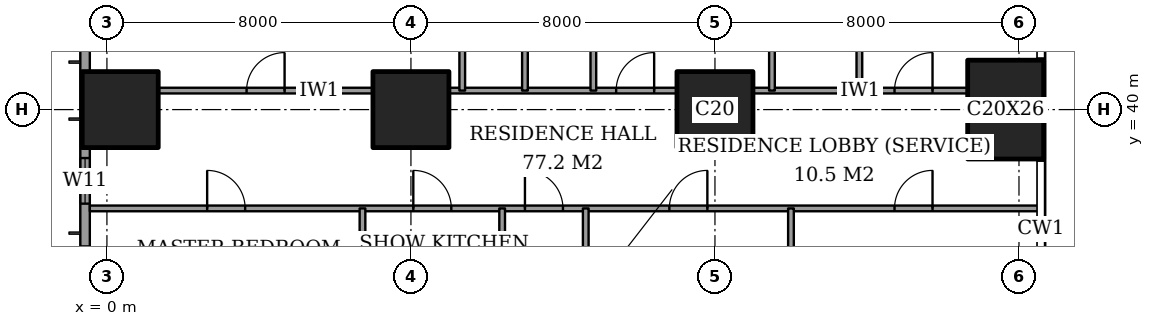
"""IFC4 building model, lengths in metres.
Left out: names, types, materials, properties, quantities, classifications, styles, units other than length and angle.
Written with IfcOpenShell. Run it as: python <this file> out.ifc"""

import sys

from ifc_helpers import new_model, si_unit, direction, frame, frame_2d, origin, origin_2d, place, context, subcontext, project, spatial, rectangle, extrude, element, fill, save


model = new_model("IFC4")
c1 = context("Model", 3, precision=1e-05, world=origin(), true_north=direction((0.0, 1.0)))
c2 = subcontext(c1, "Body", "Model", "MODEL_VIEW")
j1 = project(units=[si_unit("LENGTHUNIT", "METRE"), si_unit("PLANEANGLEUNIT", "RADIAN")], contexts=[c1])
p1 = place(None, origin())
s1 = spatial("IfcSite", under=j1, at=p1, CompositionType="ELEMENT")
p2 = place(p1, origin())
s2 = spatial("IfcBuilding", under=s1, at=p2, CompositionType="ELEMENT")
p3 = place(p2, frame((0.0, 0.0, 161.0)))
s3 = spatial("IfcBuildingStorey", under=s2, at=p3, CompositionType="ELEMENT", Elevation=161.0)
for number, where, z_axis, x_axis in (
    (1, (0.35, 40.0, 0.0), (0.0, 0.0, 1.0), (1.0, 0.0, 0.0)),
    (2, (8.0, 40.0, 0.0), (0.0, 0.0, 1.0), (1.0, 0.0, 0.0)),
    (3, (16.0, 40.0, 0.0), (0.0, 0.0, 1.0), (1.0, 0.0, 0.0)),
):
    element("IfcColumn", number, at=place(p3, frame(where, z_axis=z_axis, x_axis=x_axis)), inside=s3, PredefinedType="COLUMN", context=c2, shape_type="SweptSolid", body=[
        extrude(rectangle(XDim=2.0, YDim=2.0, at=origin_2d()), origin(), (0.0, 0.0, 1.0), 3.6),
    ])
p4 = place(p3, frame((23.65, 40.0, 0.0), z_axis=(0.0, 0.0, 1.0), x_axis=(1.0, 0.0, 0.0)))
e4 = element("IfcColumn", 4, at=p4, inside=s3, PredefinedType="COLUMN", context=c2, shape_type="SweptSolid", body=[
    extrude(rectangle(XDim=2.0, YDim=2.6, at=origin_2d()), origin(), (0.0, 0.0, 1.0), 3.6),
])
p5 = place(p3, frame((-0.575, 44.825, 0.0), z_axis=(0.0, 0.0, 1.0), x_axis=(0.0, -1.0, 0.0)))
e5 = element("IfcWall", 5, at=p5, inside=s3, PredefinedType="SOLIDWALL", context=c2, shape_type="SweptSolid", body=[
    extrude(rectangle(XDim=41.65, YDim=0.25, at=frame_2d((20.825, 0.0))), origin(), (0.0, 0.0, 1.0), 3.6),
])
p6 = place(p5, frame((0.775, 0.0, 0.4)))
e6 = element("IfcOpeningElement", 6, at=p6, cuts=e5, PredefinedType="OPENING", context=c2, shape_type="SweptSolid", body=[
    extrude(rectangle(XDim=2.4, YDim=2.2, at=frame_2d((1.2, 1.1))), frame((0.0, 0.135, 0.0), z_axis=(0.0, -1.0, 0.0), x_axis=(1.0, 0.0, 0.0)), (0.0, 0.0, 1.0), 0.27),
])
p7 = place(p5, frame((6.1, 0.0, 0.4)))
e7 = element("IfcOpeningElement", 7, at=p7, cuts=e5, PredefinedType="OPENING", context=c2, shape_type="SweptSolid", body=[
    extrude(rectangle(XDim=1.2, YDim=2.2, at=frame_2d((0.6, 1.1))), frame((0.0, 0.135, 0.0), z_axis=(0.0, -1.0, 0.0), x_axis=(1.0, 0.0, 0.0)), (0.0, 0.0, 1.0), 0.27),
])
p8 = place(p5, frame((8.425, 0.0, 0.4)))
e8 = element("IfcOpeningElement", 8, at=p8, cuts=e5, PredefinedType="OPENING", context=c2, shape_type="SweptSolid", body=[
    extrude(rectangle(XDim=2.4, YDim=2.2, at=frame_2d((1.2, 1.1))), frame((0.0, 0.135, 0.0), z_axis=(0.0, -1.0, 0.0), x_axis=(1.0, 0.0, 0.0)), (0.0, 0.0, 1.0), 0.27),
])
p9 = place(p5, frame((15.625, 0.0, 0.4)))
e9 = element("IfcOpeningElement", 9, at=p9, cuts=e5, PredefinedType="OPENING", context=c2, shape_type="SweptSolid", body=[
    extrude(rectangle(XDim=2.4, YDim=2.2, at=frame_2d((1.2, 1.1))), frame((0.0, 0.135, 0.0), z_axis=(0.0, -1.0, 0.0), x_axis=(1.0, 0.0, 0.0)), (0.0, 0.0, 1.0), 0.27),
])
p10 = place(p5, frame((23.625, 0.0, 0.4)))
e10 = element("IfcOpeningElement", 10, at=p10, cuts=e5, PredefinedType="OPENING", context=c2, shape_type="SweptSolid", body=[
    extrude(rectangle(XDim=2.4, YDim=2.2, at=frame_2d((1.2, 1.1))), frame((0.0, 0.135, 0.0), z_axis=(0.0, -1.0, 0.0), x_axis=(1.0, 0.0, 0.0)), (0.0, 0.0, 1.0), 0.27),
])
p11 = place(p5, frame((30.825, 0.0, 0.4)))
e11 = element("IfcOpeningElement", 11, at=p11, cuts=e5, PredefinedType="OPENING", context=c2, shape_type="SweptSolid", body=[
    extrude(rectangle(XDim=2.4, YDim=2.2, at=frame_2d((1.2, 1.1))), frame((0.0, 0.135, 0.0), z_axis=(0.0, -1.0, 0.0), x_axis=(1.0, 0.0, 0.0)), (0.0, 0.0, 1.0), 0.27),
])
p12 = place(p5, frame((34.5, 0.0, 0.4)))
e12 = element("IfcOpeningElement", 12, at=p12, cuts=e5, PredefinedType="OPENING", context=c2, shape_type="SweptSolid", body=[
    extrude(rectangle(XDim=1.2, YDim=2.2, at=frame_2d((0.6, 1.1))), frame((0.0, 0.135, 0.0), z_axis=(0.0, -1.0, 0.0), x_axis=(1.0, 0.0, 0.0)), (0.0, 0.0, 1.0), 0.27),
])
p13 = place(p5, frame((38.475, 0.0, 0.4)))
e13 = element("IfcOpeningElement", 13, at=p13, cuts=e5, PredefinedType="OPENING", context=c2, shape_type="SweptSolid", body=[
    extrude(rectangle(XDim=2.4, YDim=2.2, at=frame_2d((1.2, 1.1))), frame((0.0, 0.135, 0.0), z_axis=(0.0, -1.0, 0.0), x_axis=(1.0, 0.0, 0.0)), (0.0, 0.0, 1.0), 0.27),
])
p14 = place(p3, frame((-0.45, 37.4, 0.0), z_axis=(0.0, 0.0, 1.0), x_axis=(1.0, 0.0, 0.0)))
e14 = element("IfcWall", 14, at=p14, inside=s3, PredefinedType="PARTITIONING", context=c2, shape_type="SweptSolid", body=[
    extrude(rectangle(XDim=25.011, YDim=0.15, at=frame_2d((12.505, 0.0))), origin(), (0.0, 0.0, 1.0), 3.35),
])
p15 = place(p14, frame((11.45, 0.0, 0.0)))
e15 = element("IfcOpeningElement", 15, at=p15, cuts=e14, PredefinedType="OPENING", context=c2, shape_type="SweptSolid", body=[
    extrude(rectangle(XDim=1.0, YDim=2.1, at=frame_2d((0.5, 1.05))), frame((0.0, 0.085, 0.0), z_axis=(0.0, -1.0, 0.0), x_axis=(1.0, 0.0, 0.0)), (0.0, 0.0, 1.0), 0.17),
])
p16 = place(p14, frame((3.087, 0.0, 0.0)))
e16 = element("IfcOpeningElement", 16, at=p16, cuts=e14, PredefinedType="OPENING", context=c2, shape_type="SweptSolid", body=[
    extrude(rectangle(XDim=1.0, YDim=2.1, at=frame_2d((0.5, 1.05))), frame((0.0, 0.085, 0.0), z_axis=(0.0, -1.0, 0.0), x_axis=(1.0, 0.0, 0.0)), (0.0, 0.0, 1.0), 0.17),
])
p17 = place(p14, frame((8.512, 0.0, 0.0)))
e17 = element("IfcOpeningElement", 17, at=p17, cuts=e14, PredefinedType="OPENING", context=c2, shape_type="SweptSolid", body=[
    extrude(rectangle(XDim=1.0, YDim=2.1, at=frame_2d((0.5, 1.05))), frame((0.0, 0.085, 0.0), z_axis=(0.0, -1.0, 0.0), x_axis=(1.0, 0.0, 0.0)), (0.0, 0.0, 1.0), 0.17),
])
p18 = place(p14, frame((15.25, 0.0, 0.0)))
e18 = element("IfcOpeningElement", 18, at=p18, cuts=e14, PredefinedType="OPENING", context=c2, shape_type="SweptSolid", body=[
    extrude(rectangle(XDim=1.0, YDim=2.1, at=frame_2d((0.5, 1.05))), frame((0.0, 0.085, 0.0), z_axis=(0.0, -1.0, 0.0), x_axis=(1.0, 0.0, 0.0)), (0.0, 0.0, 1.0), 0.17),
])
p19 = place(p14, frame((21.175, 0.0, 0.0)))
e19 = element("IfcOpeningElement", 19, at=p19, cuts=e14, PredefinedType="OPENING", context=c2, shape_type="SweptSolid", body=[
    extrude(rectangle(XDim=1.0, YDim=2.1, at=frame_2d((0.5, 1.05))), frame((0.0, 0.085, 0.0), z_axis=(0.0, -1.0, 0.0), x_axis=(1.0, 0.0, 0.0)), (0.0, 0.0, 1.0), 0.17),
])
p20 = place(p3, frame((1.35, 40.5, 0.0), z_axis=(0.0, 0.0, 1.0), x_axis=(1.0, 0.0, 0.0)))
e20 = element("IfcWall", 20, at=p20, inside=s3, PredefinedType="PARTITIONING", context=c2, shape_type="SweptSolid", body=[
    extrude(rectangle(XDim=5.65, YDim=0.15, at=frame_2d((2.825, 0.0))), origin(), (0.0, 0.0, 1.0), 3.35),
])
p21 = place(p20, frame((2.325, 0.0, 0.0)))
e21 = element("IfcOpeningElement", 21, at=p21, cuts=e20, PredefinedType="OPENING", context=c2, shape_type="SweptSolid", body=[
    extrude(rectangle(XDim=1.0, YDim=2.1, at=frame_2d((0.5, 1.05))), frame((0.0, 0.085, 0.0), z_axis=(0.0, -1.0, 0.0), x_axis=(1.0, 0.0, 0.0)), (0.0, 0.0, 1.0), 0.17),
])
p22 = place(p3, frame((9.0, 40.5, 0.0), z_axis=(0.0, 0.0, 1.0), x_axis=(1.0, 0.0, 0.0)))
e22 = element("IfcWall", 22, at=p22, inside=s3, PredefinedType="PARTITIONING", context=c2, shape_type="SweptSolid", body=[
    extrude(rectangle(XDim=6.0, YDim=0.15, at=frame_2d((3.0, 0.0))), origin(), (0.0, 0.0, 1.0), 3.35),
])
p23 = place(p22, frame((4.4, 0.0, 0.0)))
e23 = element("IfcOpeningElement", 23, at=p23, cuts=e22, PredefinedType="OPENING", context=c2, shape_type="SweptSolid", body=[
    extrude(rectangle(XDim=1.0, YDim=2.1, at=frame_2d((0.5, 1.05))), frame((0.0, 0.085, 0.0), z_axis=(0.0, -1.0, 0.0), x_axis=(1.0, 0.0, 0.0)), (0.0, 0.0, 1.0), 0.17),
])
p24 = place(p3, frame((17.0, 40.5, 0.0), z_axis=(0.0, 0.0, 1.0), x_axis=(1.0, 0.0, 0.0)))
e24 = element("IfcWall", 24, at=p24, inside=s3, PredefinedType="PARTITIONING", context=c2, shape_type="SweptSolid", body=[
    extrude(rectangle(XDim=5.65, YDim=0.15, at=frame_2d((2.825, 0.0))), origin(), (0.0, 0.0, 1.0), 3.35),
])
p25 = place(p24, frame((3.725, 0.0, 0.0)))
e25 = element("IfcOpeningElement", 25, at=p25, cuts=e24, PredefinedType="OPENING", context=c2, shape_type="SweptSolid", body=[
    extrude(rectangle(XDim=1.0, YDim=2.1, at=frame_2d((0.5, 1.05))), frame((0.0, 0.085, 0.0), z_axis=(0.0, -1.0, 0.0), x_axis=(1.0, 0.0, 0.0)), (0.0, 0.0, 1.0), 0.17),
])
p26 = place(p3, frame((6.725, 33.2, 0.0), z_axis=(0.0, 0.0, 1.0), x_axis=(0.0, 1.0, 0.0)))
e26 = element("IfcWall", 26, at=p26, inside=s3, PredefinedType="PARTITIONING", context=c2, shape_type="SweptSolid", body=[
    extrude(rectangle(XDim=4.2, YDim=0.15, at=frame_2d((2.1, 0.0))), origin(), (0.0, 0.0, 1.0), 3.35),
])
p27 = place(p3, frame((9.35, 40.5, 0.0), z_axis=(0.0, 0.0, 1.0), x_axis=(0.0, 1.0, 0.0)))
e27 = element("IfcWall", 27, at=p27, inside=s3, PredefinedType="PARTITIONING", context=c2, shape_type="SweptSolid", body=[
    extrude(rectangle(XDim=7.95, YDim=0.15, at=frame_2d((3.975, 0.0))), origin(), (0.0, 0.0, 1.0), 3.35),
])
p28 = place(p27, frame((3.525, 0.0, 0.0)))
e28 = element("IfcOpeningElement", 28, at=p28, cuts=e27, PredefinedType="OPENING", context=c2, shape_type="SweptSolid", body=[
    extrude(rectangle(XDim=0.9, YDim=2.1, at=frame_2d((0.45, 1.05))), frame((0.0, 0.085, 0.0), z_axis=(0.0, -1.0, 0.0), x_axis=(1.0, 0.0, 0.0)), (0.0, 0.0, 1.0), 0.17),
])
p29 = place(p3, frame((10.4, 28.0, 0.0), z_axis=(0.0, 0.0, 1.0), x_axis=(0.0, 1.0, 0.0)))
e29 = element("IfcWall", 29, at=p29, inside=s3, PredefinedType="PARTITIONING", context=c2, shape_type="SweptSolid", body=[
    extrude(rectangle(XDim=9.4, YDim=0.15, at=frame_2d((4.7, 0.0))), origin(), (0.0, 0.0, 1.0), 3.35),
])
p30 = place(p29, frame((0.837, 0.0, 0.0)))
e30 = element("IfcOpeningElement", 30, at=p30, cuts=e29, PredefinedType="OPENING", context=c2, shape_type="SweptSolid", body=[
    extrude(rectangle(XDim=1.0, YDim=2.1, at=frame_2d((0.5, 1.05))), frame((0.0, 0.085, 0.0), z_axis=(0.0, -1.0, 0.0), x_axis=(1.0, 0.0, 0.0)), (0.0, 0.0, 1.0), 0.17),
])
p31 = place(p3, frame((11.0, 40.5, 0.0), z_axis=(0.0, 0.0, 1.0), x_axis=(0.0, 1.0, 0.0)))
e31 = element("IfcWall", 31, at=p31, inside=s3, PredefinedType="PARTITIONING", context=c2, shape_type="SweptSolid", body=[
    extrude(rectangle(XDim=7.95, YDim=0.15, at=frame_2d((3.975, 0.0))), origin(), (0.0, 0.0, 1.0), 3.35),
])
p32 = place(p3, frame((12.6, 30.675, 0.0), z_axis=(0.0, 0.0, 1.0), x_axis=(0.0, 1.0, 0.0)))
e32 = element("IfcWall", 32, at=p32, inside=s3, PredefinedType="PARTITIONING", context=c2, shape_type="SweptSolid", body=[
    extrude(rectangle(XDim=6.725, YDim=0.15, at=frame_2d((3.362, 0.0))), origin(), (0.0, 0.0, 1.0), 3.35),
])
p33 = place(p3, frame((12.8, 40.5, 0.0), z_axis=(0.0, 0.0, 1.0), x_axis=(0.0, 1.0, 0.0)))
e33 = element("IfcWall", 33, at=p33, inside=s3, PredefinedType="PARTITIONING", context=c2, shape_type="SweptSolid", body=[
    extrude(rectangle(XDim=7.95, YDim=0.15, at=frame_2d((3.975, 0.0))), origin(), (0.0, 0.0, 1.0), 3.35),
])
p34 = place(p33, frame((3.525, 0.0, 0.0)))
e34 = element("IfcOpeningElement", 34, at=p34, cuts=e33, PredefinedType="OPENING", context=c2, shape_type="SweptSolid", body=[
    extrude(rectangle(XDim=0.9, YDim=2.1, at=frame_2d((0.45, 1.05))), frame((0.0, 0.085, 0.0), z_axis=(0.0, -1.0, 0.0), x_axis=(1.0, 0.0, 0.0)), (0.0, 0.0, 1.0), 0.17),
])
p35 = place(p3, frame((17.5, 40.5, 0.0), z_axis=(0.0, 0.0, 1.0), x_axis=(0.0, 1.0, 0.0)))
e35 = element("IfcWall", 35, at=p35, inside=s3, PredefinedType="PARTITIONING", context=c2, shape_type="SweptSolid", body=[
    extrude(rectangle(XDim=7.95, YDim=0.15, at=frame_2d((3.975, 0.0))), origin(), (0.0, 0.0, 1.0), 3.35),
])
p36 = place(p3, frame((18.0, 33.5, 0.0), z_axis=(0.0, 0.0, 1.0), x_axis=(0.0, 1.0, 0.0)))
e36 = element("IfcWall", 36, at=p36, inside=s3, PredefinedType="PARTITIONING", context=c2, shape_type="SweptSolid", body=[
    extrude(rectangle(XDim=3.9, YDim=0.15, at=frame_2d((1.95, 0.0))), origin(), (0.0, 0.0, 1.0), 3.35),
])
p37 = place(p3, frame((19.8, 40.5, 0.0), z_axis=(0.0, 0.0, 1.0), x_axis=(0.0, 1.0, 0.0)))
e37 = element("IfcWall", 37, at=p37, inside=s3, PredefinedType="PARTITIONING", context=c2, shape_type="SweptSolid", body=[
    extrude(rectangle(XDim=7.95, YDim=0.15, at=frame_2d((3.975, 0.0))), origin(), (0.0, 0.0, 1.0), 3.35),
])
p38 = place(p37, frame((3.525, 0.0, 0.0)))
e38 = element("IfcOpeningElement", 38, at=p38, cuts=e37, PredefinedType="OPENING", context=c2, shape_type="SweptSolid", body=[
    extrude(rectangle(XDim=0.9, YDim=2.1, at=frame_2d((0.45, 1.05))), frame((0.0, 0.085, 0.0), z_axis=(0.0, -1.0, 0.0), x_axis=(1.0, 0.0, 0.0)), (0.0, 0.0, 1.0), 0.17),
])
p39 = place(p7, origin())
e39 = element("IfcWindow", 39, at=p39, inside=s3, PartitioningType="SINGLE_PANEL", PredefinedType="WINDOW", context=c2, shape_type="SweptSolid", body=[
    extrude(rectangle(XDim=1.2, YDim=2.2, at=frame_2d((0.6, 1.1))), frame((0.0, 0.03, 0.0), z_axis=(0.0, -1.0, 0.0), x_axis=(1.0, 0.0, 0.0)), (0.0, 0.0, 1.0), 0.06),
])
fill(e7, e39)
p40 = place(p21, origin())
e40 = element("IfcDoor", 40, at=p40, inside=s3, OperationType="SINGLE_SWING_LEFT", PredefinedType="DOOR", context=c2, shape_type="SweptSolid", body=[
    extrude(rectangle(XDim=1.0, YDim=2.1, at=frame_2d((0.5, 1.05))), frame((0.0, 0.025, 0.0), z_axis=(0.0, -1.0, 0.0), x_axis=(1.0, 0.0, 0.0)), (0.0, 0.0, 1.0), 0.05),
])
fill(e21, e40)
p41 = place(p23, origin())
e41 = element("IfcDoor", 41, at=p41, inside=s3, OperationType="SINGLE_SWING_LEFT", PredefinedType="DOOR", context=c2, shape_type="SweptSolid", body=[
    extrude(rectangle(XDim=1.0, YDim=2.1, at=frame_2d((0.5, 1.05))), frame((0.0, 0.025, 0.0), z_axis=(0.0, -1.0, 0.0), x_axis=(1.0, 0.0, 0.0)), (0.0, 0.0, 1.0), 0.05),
])
fill(e23, e41)
p42 = place(p25, origin())
e42 = element("IfcDoor", 42, at=p42, inside=s3, OperationType="SINGLE_SWING_LEFT", PredefinedType="DOOR", context=c2, shape_type="SweptSolid", body=[
    extrude(rectangle(XDim=1.0, YDim=2.1, at=frame_2d((0.5, 1.05))), frame((0.0, 0.025, 0.0), z_axis=(0.0, -1.0, 0.0), x_axis=(1.0, 0.0, 0.0)), (0.0, 0.0, 1.0), 0.05),
])
fill(e25, e42)
p43 = place(p15, origin())
e43 = element("IfcDoor", 43, at=p43, inside=s3, OperationType="SINGLE_SWING_RIGHT", PredefinedType="DOOR", context=c2, shape_type="SweptSolid", body=[
    extrude(rectangle(XDim=1.0, YDim=2.1, at=frame_2d((0.5, 1.05))), frame((0.0, 0.025, 0.0), z_axis=(0.0, -1.0, 0.0), x_axis=(1.0, 0.0, 0.0)), (0.0, 0.0, 1.0), 0.05),
])
fill(e15, e43)
p44 = place(p16, origin())
e44 = element("IfcDoor", 44, at=p44, inside=s3, OperationType="SINGLE_SWING_RIGHT", PredefinedType="DOOR", context=c2, shape_type="SweptSolid", body=[
    extrude(rectangle(XDim=1.0, YDim=2.1, at=frame_2d((0.5, 1.05))), frame((0.0, 0.025, 0.0), z_axis=(0.0, -1.0, 0.0), x_axis=(1.0, 0.0, 0.0)), (0.0, 0.0, 1.0), 0.05),
])
fill(e16, e44)
p45 = place(p17, origin())
e45 = element("IfcDoor", 45, at=p45, inside=s3, OperationType="SINGLE_SWING_RIGHT", PredefinedType="DOOR", context=c2, shape_type="SweptSolid", body=[
    extrude(rectangle(XDim=1.0, YDim=2.1, at=frame_2d((0.5, 1.05))), frame((0.0, 0.025, 0.0), z_axis=(0.0, -1.0, 0.0), x_axis=(1.0, 0.0, 0.0)), (0.0, 0.0, 1.0), 0.05),
])
fill(e17, e45)
p46 = place(p18, origin())
e46 = element("IfcDoor", 46, at=p46, inside=s3, OperationType="SINGLE_SWING_LEFT", PredefinedType="DOOR", context=c2, shape_type="SweptSolid", body=[
    extrude(rectangle(XDim=1.0, YDim=2.1, at=frame_2d((0.5, 1.05))), frame((0.0, 0.025, 0.0), z_axis=(0.0, -1.0, 0.0), x_axis=(1.0, 0.0, 0.0)), (0.0, 0.0, 1.0), 0.05),
])
fill(e18, e46)
p47 = place(p19, origin())
e47 = element("IfcDoor", 47, at=p47, inside=s3, OperationType="SINGLE_SWING_LEFT", PredefinedType="DOOR", context=c2, shape_type="SweptSolid", body=[
    extrude(rectangle(XDim=1.0, YDim=2.1, at=frame_2d((0.5, 1.05))), frame((0.0, 0.025, 0.0), z_axis=(0.0, -1.0, 0.0), x_axis=(1.0, 0.0, 0.0)), (0.0, 0.0, 1.0), 0.05),
])
fill(e19, e47)
save(model, sys.argv[1])
